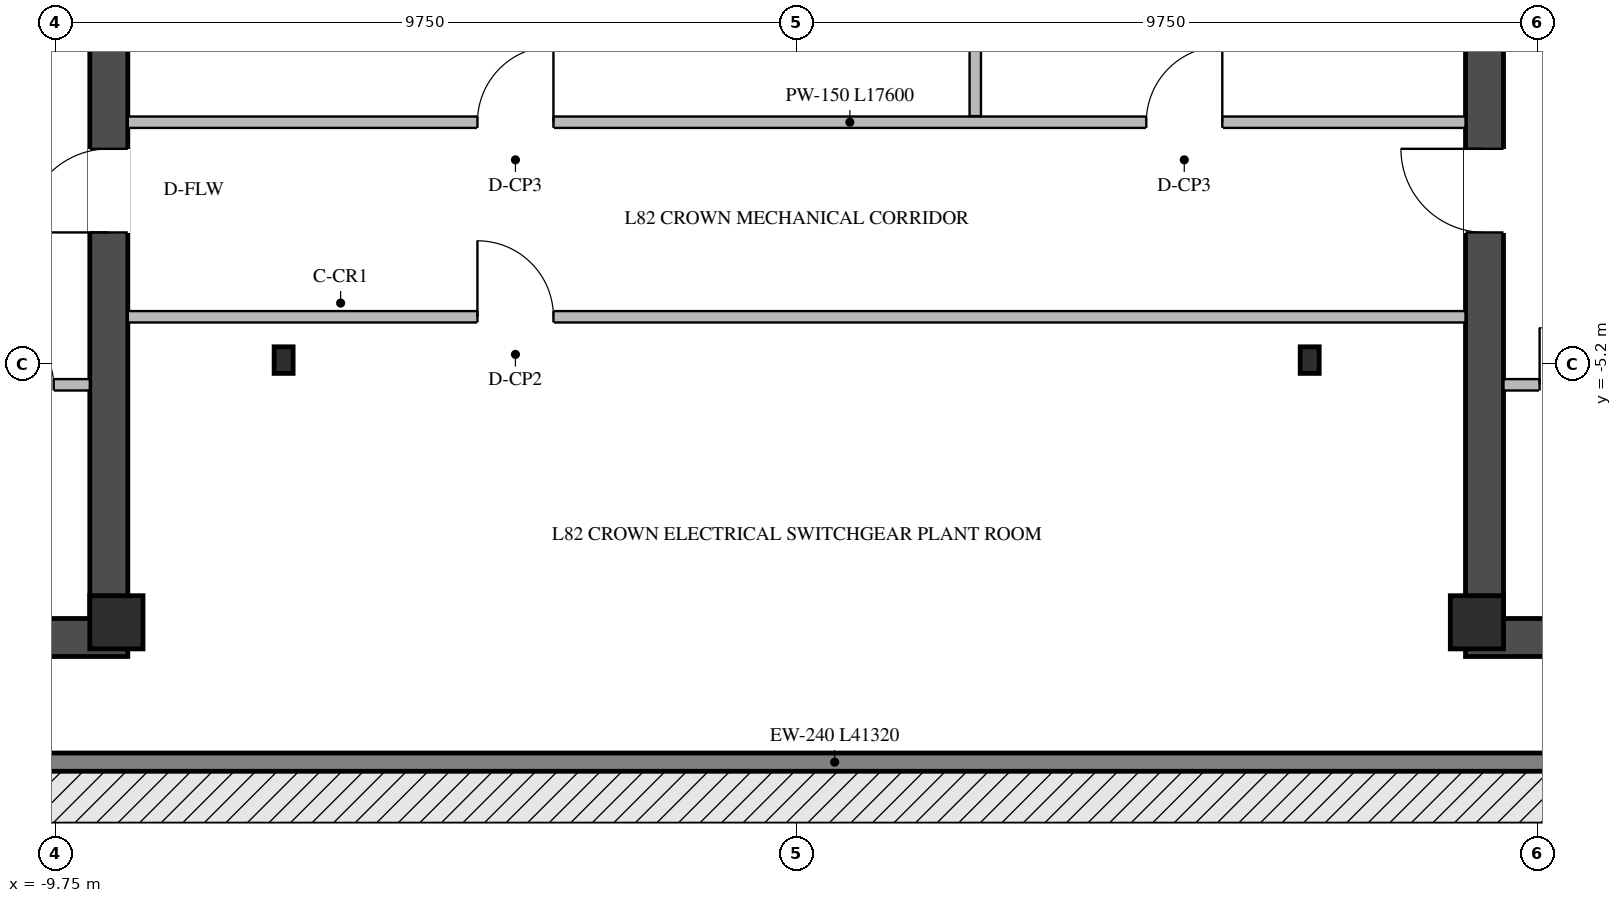
"""IFC4 building model, lengths in metres.
Left out: names, types, materials, properties, quantities, classifications, styles, units other than length and angle.
Written with IfcOpenShell. Run it as: python <this file> out.ifc"""

import sys

from ifc_helpers import new_model, si_unit, direction, frame, frame_2d, origin, origin_2d, place, context, subcontext, project, spatial, rectangle, i_section, extrude, element, fill, save


model = new_model("IFC4")
c1 = context("Model", 3, precision=1e-05, world=origin(), true_north=direction((0.0, 1.0)))
c2 = subcontext(c1, "Body", "Model", "MODEL_VIEW")
j1 = project(units=[si_unit("LENGTHUNIT", "METRE"), si_unit("PLANEANGLEUNIT", "RADIAN")], contexts=[c1])
p1 = place(None, origin())
s1 = spatial("IfcSite", under=j1, at=p1, CompositionType="ELEMENT")
p2 = place(p1, origin())
s2 = spatial("IfcBuilding", under=s1, at=p2, CompositionType="ELEMENT")
p3 = place(p2, frame((0.0, 0.0, 301.35)))
s3 = spatial("IfcBuildingStorey", under=s2, at=p3, CompositionType="ELEMENT", Elevation=301.35)
p4 = place(p3, frame((-19.05, -8.8, 0.0), z_axis=(0.0, 0.0, 1.0), x_axis=(1.0, 0.0, 0.0)))
e1 = element("IfcWall", 1, at=p4, inside=s3, PredefinedType="SHEAR", context=c2, shape_type="SweptSolid", body=[
    extrude(rectangle(XDim=10.25, YDim=0.5, at=frame_2d((5.125, 0.0))), origin(), (0.0, 0.0, 1.0), 3.35),
])
p5 = place(p3, frame((-9.05, -8.55, 0.0), z_axis=(0.0, 0.0, 1.0), x_axis=(0.0, 1.0, 0.0)))
e2 = element("IfcWall", 2, at=p5, inside=s3, PredefinedType="SHEAR", context=c2, shape_type="SweptSolid", body=[
    extrude(rectangle(XDim=17.1, YDim=0.5, at=frame_2d((8.55, 0.0))), origin(), (0.0, 0.0, 1.0), 3.35),
])
p6 = place(p5, frame((5.08, 0.0, 0.0)))
e3 = element("IfcOpeningElement", 3, at=p6, cuts=e2, PredefinedType="OPENING", context=c2, shape_type="SweptSolid", body=[
    extrude(rectangle(XDim=1.1, YDim=2.08, at=frame_2d((0.55, 1.04))), frame((0.0, 0.26, 0.0), z_axis=(0.0, -1.0, 0.0), x_axis=(1.0, 0.0, 0.0)), (0.0, 0.0, 1.0), 0.52),
])
p7 = place(p3, frame((8.8, -8.8, 0.0), z_axis=(0.0, 0.0, 1.0), x_axis=(1.0, 0.0, 0.0)))
e4 = element("IfcWall", 4, at=p7, inside=s3, PredefinedType="SHEAR", context=c2, shape_type="SweptSolid", body=[
    extrude(rectangle(XDim=10.25, YDim=0.5, at=frame_2d((5.125, 0.0))), origin(), (0.0, 0.0, 1.0), 3.35),
])
p8 = place(p3, frame((9.05, -8.55, 0.0), z_axis=(0.0, 0.0, 1.0), x_axis=(0.0, 1.0, 0.0)))
e5 = element("IfcWall", 5, at=p8, inside=s3, PredefinedType="SHEAR", context=c2, shape_type="SweptSolid", body=[
    extrude(rectangle(XDim=17.1, YDim=0.5, at=frame_2d((8.55, 0.0))), origin(), (0.0, 0.0, 1.0), 3.35),
])
p9 = place(p8, frame((5.08, 0.0, 0.0)))
e6 = element("IfcOpeningElement", 6, at=p9, cuts=e5, PredefinedType="OPENING", context=c2, shape_type="SweptSolid", body=[
    extrude(rectangle(XDim=1.1, YDim=2.08, at=frame_2d((0.55, 1.04))), frame((0.0, 0.26, 0.0), z_axis=(0.0, -1.0, 0.0), x_axis=(1.0, 0.0, 0.0)), (0.0, 0.0, 1.0), 0.52),
])
for number, where, z_axis, x_axis in (
    (7, (-8.95, -8.6, 0.0), (0.0, 0.0, 1.0), (1.0, 0.0, 0.0)),
    (8, (8.95, -8.6, 0.0), (0.0, 0.0, 1.0), (1.0, 0.0, 0.0)),
):
    element("IfcColumn", number, at=place(p3, frame(where, z_axis=z_axis, x_axis=x_axis)), inside=s3, PredefinedType="COLUMN", context=c2, shape_type="SweptSolid", body=[
        extrude(rectangle(XDim=0.7, YDim=0.7, at=origin_2d()), origin(), (0.0, 0.0, 1.0), 3.6),
    ])
for number, where, z_axis, x_axis in (
    (9, (-6.75, -5.15, 0.0), (0.0, 0.0, 1.0), (1.0, 0.0, 0.0)),
    (10, (6.75, -5.15, 0.0), (0.0, 0.0, 1.0), (1.0, 0.0, 0.0)),
):
    element("IfcColumn", number, at=place(p3, frame(where, z_axis=z_axis, x_axis=x_axis)), inside=s3, PredefinedType="COLUMN", context=c2, shape_type="SweptSolid", body=[
        extrude(i_section(OverallWidth=0.25, OverallDepth=0.35, WebThickness=0.01, FlangeThickness=0.012, at=origin_2d()), origin(), (0.0, 0.0, 1.0), 3.6),
    ])
p10 = place(p3, frame((-20.16, -10.44, 0.0), z_axis=(0.0, 0.0, 1.0), x_axis=(1.0, 0.0, 0.0)))
e11 = element("IfcWall", 11, at=p10, inside=s3, PredefinedType="STANDARD", context=c2, shape_type="SweptSolid", body=[
    extrude(rectangle(XDim=41.32, YDim=0.24, at=frame_2d((20.66, 0.0))), origin(), (0.0, 0.0, 1.0), 3.33),
])
p11 = place(p3, frame((-12.895, -5.475, 0.0), z_axis=(0.0, 0.0, 1.0), x_axis=(1.0, 0.0, 0.0)))
e12 = element("IfcWall", 12, at=p11, inside=s3, PredefinedType="STANDARD", context=c2, shape_type="SweptSolid", body=[
    extrude(rectangle(XDim=3.595, YDim=0.15, at=frame_2d((1.797, 0.0))), origin(), (0.0, 0.0, 1.0), 3.33),
])
p12 = place(p11, frame((0.42, 0.0, 0.0)))
e13 = element("IfcOpeningElement", 13, at=p12, cuts=e12, PredefinedType="OPENING", context=c2, shape_type="SweptSolid", body=[
    extrude(rectangle(XDim=1.1, YDim=2.15, at=frame_2d((0.55, 1.075))), frame((0.0, 0.085, 0.0), z_axis=(0.0, -1.0, 0.0), x_axis=(1.0, 0.0, 0.0)), (0.0, 0.0, 1.0), 0.17),
])
p13 = place(p11, frame((2.37, 0.0, 0.0)))
e14 = element("IfcOpeningElement", 14, at=p13, cuts=e12, PredefinedType="OPENING", context=c2, shape_type="SweptSolid", body=[
    extrude(rectangle(XDim=0.75, YDim=2.05, at=frame_2d((0.375, 1.025))), frame((0.0, 0.085, 0.0), z_axis=(0.0, -1.0, 0.0), x_axis=(1.0, 0.0, 0.0)), (0.0, 0.0, 1.0), 0.17),
])
p14 = place(p3, frame((9.3, -5.475, 0.0), z_axis=(0.0, 0.0, 1.0), x_axis=(1.0, 0.0, 0.0)))
e15 = element("IfcWall", 15, at=p14, inside=s3, PredefinedType="STANDARD", context=c2, shape_type="SweptSolid", body=[
    extrude(rectangle(XDim=3.595, YDim=0.15, at=frame_2d((1.797, 0.0))), origin(), (0.0, 0.0, 1.0), 3.33),
])
p15 = place(p14, frame((2.075, 0.0, 0.0)))
e16 = element("IfcOpeningElement", 16, at=p15, cuts=e15, PredefinedType="OPENING", context=c2, shape_type="SweptSolid", body=[
    extrude(rectangle(XDim=1.1, YDim=2.15, at=frame_2d((0.55, 1.075))), frame((0.0, 0.085, 0.0), z_axis=(0.0, -1.0, 0.0), x_axis=(1.0, 0.0, 0.0)), (0.0, 0.0, 1.0), 0.17),
])
p16 = place(p14, frame((0.475, 0.0, 0.0)))
e17 = element("IfcOpeningElement", 17, at=p16, cuts=e15, PredefinedType="OPENING", context=c2, shape_type="SweptSolid", body=[
    extrude(rectangle(XDim=0.75, YDim=2.05, at=frame_2d((0.375, 1.025))), frame((0.0, 0.085, 0.0), z_axis=(0.0, -1.0, 0.0), x_axis=(1.0, 0.0, 0.0)), (0.0, 0.0, 1.0), 0.17),
])
p17 = place(p3, frame((-8.8, -2.02, 0.0), z_axis=(0.0, 0.0, 1.0), x_axis=(1.0, 0.0, 0.0)))
e18 = element("IfcWall", 18, at=p17, inside=s3, PredefinedType="STANDARD", context=c2, shape_type="SweptSolid", body=[
    extrude(rectangle(XDim=17.6, YDim=0.15, at=frame_2d((8.8, 0.0))), origin(), (0.0, 0.0, 1.0), 3.33),
])
p18 = place(p17, frame((4.6, 0.0, 0.0)))
e19 = element("IfcOpeningElement", 19, at=p18, cuts=e18, PredefinedType="OPENING", context=c2, shape_type="SweptSolid", body=[
    extrude(rectangle(XDim=1.0, YDim=2.02, at=frame_2d((0.5, 1.01))), frame((0.0, 0.085, 0.0), z_axis=(0.0, -1.0, 0.0), x_axis=(1.0, 0.0, 0.0)), (0.0, 0.0, 1.0), 0.17),
])
p19 = place(p17, frame((13.4, 0.0, 0.0)))
e20 = element("IfcOpeningElement", 20, at=p19, cuts=e18, PredefinedType="OPENING", context=c2, shape_type="SweptSolid", body=[
    extrude(rectangle(XDim=1.0, YDim=2.02, at=frame_2d((0.5, 1.01))), frame((0.0, 0.085, 0.0), z_axis=(0.0, -1.0, 0.0), x_axis=(1.0, 0.0, 0.0)), (0.0, 0.0, 1.0), 0.17),
])
p20 = place(p3, frame((2.35, -1.94, 0.0), z_axis=(0.0, 0.0, 1.0), x_axis=(0.0, 1.0, 0.0)))
e21 = element("IfcWall", 21, at=p20, inside=s3, PredefinedType="STANDARD", context=c2, shape_type="SweptSolid", body=[
    extrude(rectangle(XDim=12.48, YDim=0.15, at=frame_2d((6.24, 0.0))), origin(), (0.0, 0.0, 1.0), 3.33),
])
p21 = place(p3, frame((-8.8, -4.58, 0.0), z_axis=(0.0, 0.0, 1.0), x_axis=(1.0, 0.0, 0.0)))
e22 = element("IfcWall", 22, at=p21, inside=s3, PredefinedType="STANDARD", context=c2, shape_type="SweptSolid", body=[
    extrude(rectangle(XDim=17.6, YDim=0.15, at=frame_2d((8.8, 0.0))), origin(), (0.0, 0.0, 1.0), 3.33),
])
p22 = place(p21, frame((4.6, 0.0, 0.0)))
e23 = element("IfcOpeningElement", 23, at=p22, cuts=e22, PredefinedType="OPENING", context=c2, shape_type="SweptSolid", body=[
    extrude(rectangle(XDim=1.0, YDim=2.02, at=frame_2d((0.5, 1.01))), frame((0.0, 0.085, 0.0), z_axis=(0.0, -1.0, 0.0), x_axis=(1.0, 0.0, 0.0)), (0.0, 0.0, 1.0), 0.17),
])
p23 = place(p13, origin())
e24 = element("IfcDoor", 24, at=p23, inside=s3, OperationType="SINGLE_SWING_LEFT", PredefinedType="DOOR", context=c2, shape_type="SweptSolid", body=[
    extrude(rectangle(XDim=0.75, YDim=2.05, at=frame_2d((0.375, 1.025))), frame((0.0, 0.025, 0.0), z_axis=(0.0, -1.0, 0.0), x_axis=(1.0, 0.0, 0.0)), (0.0, 0.0, 1.0), 0.05),
])
fill(e14, e24)
p24 = place(p6, origin())
e25 = element("IfcDoor", 25, at=p24, inside=s3, OperationType="SINGLE_SWING_LEFT", PredefinedType="DOOR", context=c2, shape_type="SweptSolid", body=[
    extrude(rectangle(XDim=1.1, YDim=2.08, at=frame_2d((0.55, 1.04))), frame((0.0, 0.205, 0.0), z_axis=(0.0, -1.0, 0.0), x_axis=(1.0, 0.0, 0.0)), (0.0, 0.0, 1.0), 0.05),
])
fill(e3, e25)
p25 = place(p16, origin())
e26 = element("IfcDoor", 26, at=p25, inside=s3, OperationType="SINGLE_SWING_LEFT", PredefinedType="DOOR", context=c2, shape_type="SweptSolid", body=[
    extrude(rectangle(XDim=0.75, YDim=2.05, at=frame_2d((0.375, 1.025))), frame((0.0, 0.025, 0.0), z_axis=(0.0, -1.0, 0.0), x_axis=(1.0, 0.0, 0.0)), (0.0, 0.0, 1.0), 0.05),
])
fill(e17, e26)
p26 = place(p9, origin())
e27 = element("IfcDoor", 27, at=p26, inside=s3, OperationType="SINGLE_SWING_RIGHT", PredefinedType="DOOR", context=c2, shape_type="SweptSolid", body=[
    extrude(rectangle(XDim=1.1, YDim=2.08, at=frame_2d((0.55, 1.04))), frame((0.0, -0.155, 0.0), z_axis=(0.0, -1.0, 0.0), x_axis=(1.0, 0.0, 0.0)), (0.0, 0.0, 1.0), 0.05),
])
fill(e6, e27)
p27 = place(p18, origin())
e28 = element("IfcDoor", 28, at=p27, inside=s3, OperationType="SINGLE_SWING_RIGHT", PredefinedType="DOOR", context=c2, shape_type="SweptSolid", body=[
    extrude(rectangle(XDim=1.0, YDim=2.02, at=frame_2d((0.5, 1.01))), frame((0.0, 0.025, 0.0), z_axis=(0.0, -1.0, 0.0), x_axis=(1.0, 0.0, 0.0)), (0.0, 0.0, 1.0), 0.05),
])
fill(e19, e28)
p28 = place(p19, origin())
e29 = element("IfcDoor", 29, at=p28, inside=s3, OperationType="SINGLE_SWING_RIGHT", PredefinedType="DOOR", context=c2, shape_type="SweptSolid", body=[
    extrude(rectangle(XDim=1.0, YDim=2.02, at=frame_2d((0.5, 1.01))), frame((0.0, 0.025, 0.0), z_axis=(0.0, -1.0, 0.0), x_axis=(1.0, 0.0, 0.0)), (0.0, 0.0, 1.0), 0.05),
])
fill(e20, e29)
p29 = place(p22, origin())
e30 = element("IfcDoor", 30, at=p29, inside=s3, OperationType="SINGLE_SWING_LEFT", PredefinedType="DOOR", context=c2, shape_type="SweptSolid", body=[
    extrude(rectangle(XDim=1.0, YDim=2.02, at=frame_2d((0.5, 1.01))), frame((0.0, 0.025, 0.0), z_axis=(0.0, -1.0, 0.0), x_axis=(1.0, 0.0, 0.0)), (0.0, 0.0, 1.0), 0.05),
])
fill(e23, e30)
save(model, sys.argv[1])
